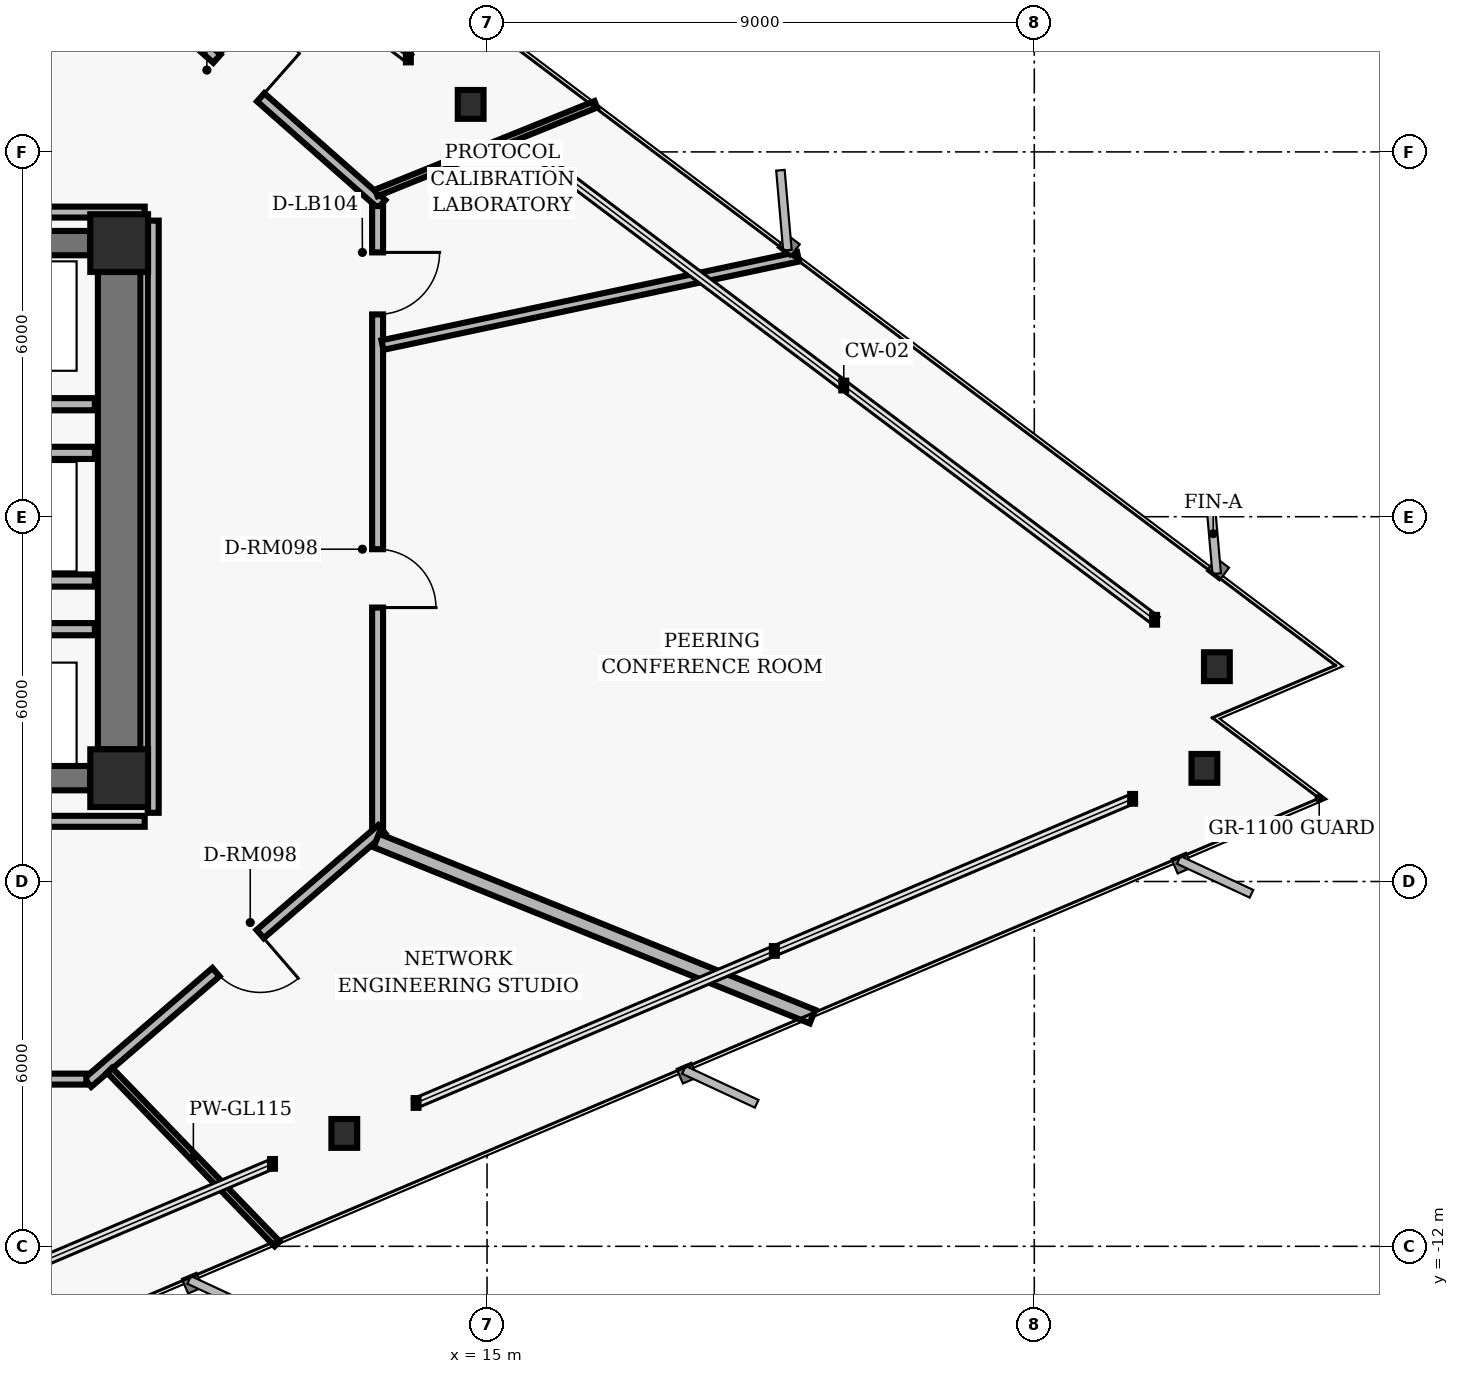
"""IFC4 building model, lengths in metres.
Left out: names, types, materials, properties, quantities, classifications, styles, units other than length and angle.
Written with IfcOpenShell. Run it as: python <this file> out.ifc"""

import sys

from ifc_helpers import new_model, si_unit, direction, frame, frame_2d, origin, origin_2d, place, context, subcontext, project, spatial, rectangle, hollow_rectangle, i_section, extrude, element, fill, save


model = new_model("IFC4")
c1 = context("Model", 3, precision=1e-05, world=origin(), true_north=direction((0.0, 1.0)))
c2 = subcontext(c1, "Body", "Model", "MODEL_VIEW")
j1 = project(units=[si_unit("LENGTHUNIT", "METRE"), si_unit("PLANEANGLEUNIT", "RADIAN")], contexts=[c1])
p1 = place(None, origin())
s1 = spatial("IfcSite", under=j1, at=p1, CompositionType="ELEMENT")
p2 = place(p1, origin())
s2 = spatial("IfcBuilding", under=s1, at=p2, CompositionType="ELEMENT")
p3 = place(p2, frame((0.0, 0.0, 52.96)))
s3 = spatial("IfcBuildingStorey", under=s2, at=p3, CompositionType="ELEMENT", Elevation=52.96)
for number, where, z_axis, x_axis in (
    (1, (8.95, 4.5, 0.0), (0.0, 0.0, 1.0), (1.0, 0.0, 0.0)),
    (2, (8.95, -4.3, 0.0), (0.0, 0.0, 1.0), (1.0, 0.0, 0.0)),
):
    element("IfcColumn", number, at=place(p3, frame(where, z_axis=z_axis, x_axis=x_axis)), inside=s3, PredefinedType="COLUMN", context=c2, shape_type="SweptSolid", body=[
        extrude(hollow_rectangle(XDim=0.95, YDim=0.95, WallThickness=0.06, InnerFilletRadius=0.02, OuterFilletRadius=0.04, at=origin_2d()), origin(), (0.0, 0.0, 1.0), 3.36),
    ])
p4 = place(p3, frame((8.95, -3.825, 0.0), z_axis=(0.0, 0.0, 1.0), x_axis=(0.0, 1.0, 0.0)))
e3 = element("IfcWall", 3, at=p4, inside=s3, PredefinedType="SHEAR", context=c2, shape_type="SweptSolid", body=[
    extrude(rectangle(XDim=7.85, YDim=0.7, at=frame_2d((3.925, 0.0))), origin(), (0.0, 0.0, 1.0), 3.098),
])
for number, where, z_axis, x_axis in (
    (4, (6.525, 4.5, 0.0), (0.0, 0.0, 1.0), (1.0, 0.0, 0.0)),
    (5, (6.525, -4.3, 0.0), (0.0, 0.0, 1.0), (1.0, 0.0, 0.0)),
):
    element("IfcWall", number, at=place(p3, frame(where, z_axis=z_axis, x_axis=x_axis)), inside=s3, PredefinedType="SHEAR", context=c2, shape_type="SweptSolid", body=[
        extrude(rectangle(XDim=1.95, YDim=0.4, at=frame_2d((0.975, 0.0))), origin(), (0.0, 0.0, 1.0), 3.098),
    ])
for number, where, z_axis, x_axis in (
    (6, (27.003, -2.467, 0.0), (0.0, 0.0, 1.0), (1.0, 0.0, 0.0)),
    (7, (14.73, 6.781, 0.0), (0.0, 0.0, 1.0), (1.0, 0.0, 0.0)),
    (8, (12.653, -10.143, 0.0), (0.0, 0.0, 1.0), (1.0, 0.0, 0.0)),
    (9, (26.798, -4.139, 0.0), (0.0, 0.0, 1.0), (1.0, 0.0, 0.0)),
):
    element("IfcColumn", number, at=place(p3, frame(where, z_axis=z_axis, x_axis=x_axis)), inside=s3, PredefinedType="COLUMN", context=c2, shape_type="SweptSolid", body=[
        extrude(i_section(OverallWidth=0.424, OverallDepth=0.474, WebThickness=0.048, FlangeThickness=0.077, FilletRadius=0.025, at=origin_2d()), origin(), (0.0, 0.0, 1.0), 3.36),
    ])
for number, where, z_axis, x_axis in (
    (10, (6.45, -1.85, 0.0), (0.0, 0.0, 1.0), (1.0, 0.0, 0.0)),
    (11, (6.45, 1.85, 0.0), (0.0, 0.0, 1.0), (1.0, 0.0, 0.0)),
):
    element("IfcWall", number, at=place(p3, frame(where, z_axis=z_axis, x_axis=x_axis)), inside=s3, PredefinedType="PARTITIONING", context=c2, shape_type="SweptSolid", body=[
        extrude(rectangle(XDim=2.1, YDim=0.2, at=frame_2d((1.05, 0.0))), origin(), (0.0, 0.0, 1.0), 3.073),
    ])
for number, where, z_axis, x_axis in (
    (12, (6.64, -1.05, 0.0), (0.0, 0.0, 1.0), (1.0, 0.0, 0.0)),
    (13, (6.64, 1.05, 0.0), (0.0, 0.0, 1.0), (1.0, 0.0, 0.0)),
):
    element("IfcWall", number, at=place(p3, frame(where, z_axis=z_axis, x_axis=x_axis)), inside=s3, PredefinedType="PARTITIONING", context=c2, shape_type="SweptSolid", body=[
        extrude(rectangle(XDim=1.91, YDim=0.2, at=frame_2d((0.955, 0.0))), origin(), (0.0, 0.0, 1.0), 3.073),
    ])
p5 = place(p3, frame((8.567, 9.29, 0.0), z_axis=(0.0, 0.0, 1.0), x_axis=(0.749626463267, -0.66186113768, 0.0)))
e14 = element("IfcWall", 14, at=p5, inside=s3, PredefinedType="PARTITIONING", context=c2, shape_type="SweptSolid", body=[
    extrude(rectangle(XDim=6.27, YDim=0.18, at=frame_2d((3.135, 0.0))), origin(), (0.0, 0.0, 1.0), 2.587),
])
p6 = place(p5, frame((2.655, 0.0, 0.0)))
e15 = element("IfcOpeningElement", 15, at=p6, cuts=e14, PredefinedType="OPENING", context=c2, shape_type="SweptSolid", body=[
    extrude(rectangle(XDim=0.96, YDim=2.02, at=frame_2d((0.48, 1.01))), frame((0.0, 0.1, 0.0), z_axis=(0.0, -1.0, 0.0), x_axis=(1.0, 0.0, 0.0)), (0.0, 0.0, 1.0), 0.2),
])
p7 = place(p3, frame((13.2, 5.11, 0.0), z_axis=(0.0, 0.0, 1.0), x_axis=(0.0, -1.0, 0.0)))
e16 = element("IfcWall", 16, at=p7, inside=s3, PredefinedType="PARTITIONING", context=c2, shape_type="SweptSolid", body=[
    extrude(rectangle(XDim=10.22, YDim=0.18, at=frame_2d((5.11, 0.0))), origin(), (0.0, 0.0, 1.0), 3.073),
])
p8 = place(p7, frame((5.644, 0.0, 0.0)))
e17 = element("IfcOpeningElement", 17, at=p8, cuts=e16, PredefinedType="OPENING", context=c2, shape_type="SweptSolid", body=[
    extrude(rectangle(XDim=0.96, YDim=2.02, at=frame_2d((0.48, 1.01))), frame((0.0, 0.1, 0.0), z_axis=(0.0, -1.0, 0.0), x_axis=(1.0, 0.0, 0.0)), (0.0, 0.0, 1.0), 0.2),
])
p9 = place(p7, frame((0.763, 0.0, 0.0)))
e18 = element("IfcOpeningElement", 18, at=p9, cuts=e16, PredefinedType="OPENING", context=c2, shape_type="SweptSolid", body=[
    extrude(rectangle(XDim=1.02, YDim=2.02, at=frame_2d((0.51, 1.01))), frame((0.0, 0.1, 0.0), z_axis=(0.0, -1.0, 0.0), x_axis=(1.0, 0.0, 0.0)), (0.0, 0.0, 1.0), 0.2),
])
p10 = place(p3, frame((13.268, -5.141, 0.0), z_axis=(0.0, 0.0, 1.0), x_axis=(-0.757534501725, -0.65279512766, 0.0)))
e19 = element("IfcWall", 19, at=p10, inside=s3, PredefinedType="PARTITIONING", context=c2, shape_type="SweptSolid", body=[
    extrude(rectangle(XDim=6.385, YDim=0.18, at=frame_2d((3.192, 0.0))), origin(), (0.0, 0.0, 1.0), 3.073),
])
p11 = place(p10, frame((2.639, 0.0, 0.0)))
e20 = element("IfcOpeningElement", 20, at=p11, cuts=e19, PredefinedType="OPENING", context=c2, shape_type="SweptSolid", body=[
    extrude(rectangle(XDim=0.96, YDim=2.02, at=frame_2d((0.48, 1.01))), frame((0.0, 0.1, 0.0), z_axis=(0.0, -1.0, 0.0), x_axis=(1.0, 0.0, 0.0)), (0.0, 0.0, 1.0), 0.2),
])
p12 = place(p3, frame((8.41, -9.25, 0.0), z_axis=(0.0, 0.0, 1.0), x_axis=(-1.0, 0.0, 0.0)))
e21 = element("IfcWall", 21, at=p12, inside=s3, PredefinedType="PARTITIONING", context=c2, shape_type="SweptSolid", body=[
    extrude(rectangle(XDim=17.0, YDim=0.18, at=frame_2d((8.5, 0.0))), origin(), (0.0, 0.0, 1.0), 2.587),
])
p13 = place(p12, frame((5.34, 0.0, 0.0)))
e22 = element("IfcOpeningElement", 22, at=p13, cuts=e21, PredefinedType="OPENING", context=c2, shape_type="SweptSolid", body=[
    extrude(rectangle(XDim=1.02, YDim=2.02, at=frame_2d((0.51, 1.01))), frame((0.0, 0.1, 0.0), z_axis=(0.0, -1.0, 0.0), x_axis=(1.0, 0.0, 0.0)), (0.0, 0.0, 1.0), 0.2),
])
p14 = place(p3, frame((6.03, -5.01, 0.0), z_axis=(0.0, 0.0, 1.0), x_axis=(1.0, 0.0, 0.0)))
e23 = element("IfcWall", 23, at=p14, inside=s3, PredefinedType="PARTITIONING", context=c2, shape_type="SweptSolid", body=[
    extrude(rectangle(XDim=3.34, YDim=0.18, at=frame_2d((1.67, 0.0))), origin(), (0.0, 0.0, 1.0), 3.073),
])
p15 = place(p3, frame((9.51, -4.87, 0.0), z_axis=(0.0, 0.0, 1.0), x_axis=(0.0, 1.0, 0.0)))
e24 = element("IfcWall", 24, at=p15, inside=s3, PredefinedType="PARTITIONING", context=c2, shape_type="SweptSolid", body=[
    extrude(rectangle(XDim=9.74, YDim=0.18, at=frame_2d((4.87, 0.0))), origin(), (0.0, 0.0, 1.0), 3.073),
])
p16 = place(p3, frame((9.37, 5.01, 0.0), z_axis=(0.0, 0.0, 1.0), x_axis=(-1.0, 0.0, 0.0)))
e25 = element("IfcWall", 25, at=p16, inside=s3, PredefinedType="PARTITIONING", context=c2, shape_type="SweptSolid", body=[
    extrude(rectangle(XDim=2.808, YDim=0.18, at=frame_2d((1.404, 0.0))), origin(), (0.0, 0.0, 1.0), 3.073),
])
p17 = place(p3, frame((8.792, -9.104, 0.0), z_axis=(0.0, 0.0, 1.0), x_axis=(0.694664773763, -0.719333616685, 0.0)))
e26 = element("IfcWall", 26, at=p17, inside=s3, PredefinedType="MOVABLE", context=c2, shape_type="SweptSolid", body=[
    extrude(rectangle(XDim=3.969, YDim=0.115, at=frame_2d((1.984, 0.0))), origin(), (0.0, 0.0, 1.0), 3.073),
])
p18 = place(p3, frame((13.178, -5.324, 0.0), z_axis=(0.0, 0.0, 1.0), x_axis=(0.927191467136, -0.374587751094, 0.0)))
e27 = element("IfcWall", 27, at=p18, inside=s3, PredefinedType="PARTITIONING", context=c2, shape_type="SweptSolid", body=[
    extrude(rectangle(XDim=7.736, YDim=0.24, at=frame_2d((3.868, 0.0))), origin(), (0.0, 0.0, 1.0), 3.073),
])
p19 = place(p3, frame((13.28, 2.823, 0.0), z_axis=(0.0, 0.0, 1.0), x_axis=(0.978150237712, 0.207899284425, 0.0)))
e28 = element("IfcWall", 28, at=p19, inside=s3, PredefinedType="PARTITIONING", context=c2, shape_type="SweptSolid", body=[
    extrude(rectangle(XDim=6.988, YDim=0.16, at=frame_2d((3.494, 0.0))), origin(), (0.0, 0.0, 1.0), 3.073),
])
p20 = place(p3, frame((13.179, 5.325, 0.0), z_axis=(0.0, 0.0, 1.0), x_axis=(0.927199532139, 0.374567787725, 0.0)))
e29 = element("IfcWall", 29, at=p20, inside=s3, PredefinedType="MOVABLE", context=c2, shape_type="SweptSolid", body=[
    extrude(rectangle(XDim=3.893, YDim=0.115, at=frame_2d((1.946, 0.0))), origin(), (0.0, 0.0, 1.0), 3.073),
])
p21 = place(p11, origin())
e30 = element("IfcDoor", 30, at=p21, inside=s3, OperationType="SINGLE_SWING_LEFT", PredefinedType="DOOR", context=c2, shape_type="SweptSolid", body=[
    extrude(rectangle(XDim=0.96, YDim=2.02, at=frame_2d((0.48, 1.01))), frame((0.0, 0.025, 0.0), z_axis=(0.0, -1.0, 0.0), x_axis=(1.0, 0.0, 0.0)), (0.0, 0.0, 1.0), 0.05),
])
fill(e20, e30)
p22 = place(p8, origin())
e31 = element("IfcDoor", 31, at=p22, inside=s3, OperationType="SINGLE_SWING_RIGHT", PredefinedType="DOOR", context=c2, shape_type="SweptSolid", body=[
    extrude(rectangle(XDim=0.96, YDim=2.02, at=frame_2d((0.48, 1.01))), frame((0.0, 0.025, 0.0), z_axis=(0.0, -1.0, 0.0), x_axis=(1.0, 0.0, 0.0)), (0.0, 0.0, 1.0), 0.05),
])
fill(e17, e31)
p23 = place(p9, origin())
e32 = element("IfcDoor", 32, at=p23, inside=s3, OperationType="SINGLE_SWING_LEFT", PredefinedType="DOOR", context=c2, shape_type="SweptSolid", body=[
    extrude(rectangle(XDim=1.02, YDim=2.02, at=frame_2d((0.51, 1.01))), frame((0.0, 0.025, 0.0), z_axis=(0.0, -1.0, 0.0), x_axis=(1.0, 0.0, 0.0)), (0.0, 0.0, 1.0), 0.05),
])
fill(e18, e32)
p24 = place(p6, origin())
e33 = element("IfcDoor", 33, at=p24, inside=s3, OperationType="SINGLE_SWING_RIGHT", PredefinedType="DOOR", context=c2, shape_type="SweptSolid", body=[
    extrude(rectangle(XDim=0.96, YDim=2.02, at=frame_2d((0.48, 1.01))), frame((0.0, 0.025, 0.0), z_axis=(0.0, -1.0, 0.0), x_axis=(1.0, 0.0, 0.0)), (0.0, 0.0, 1.0), 0.05),
])
fill(e15, e33)
save(model, sys.argv[1])
